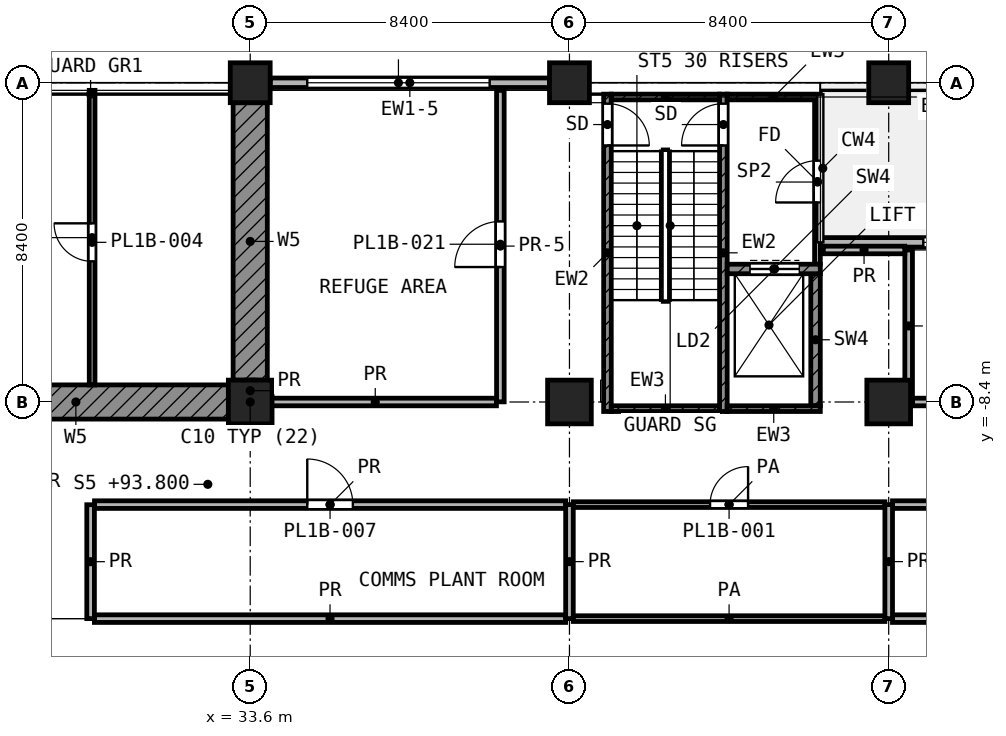
"""IFC4 building model, lengths in metres.
Left out: names, types, materials, properties, quantities, classifications, styles, units other than length and angle.
Written with IfcOpenShell. Run it as: python <this file> out.ifc"""

import sys

from ifc_helpers import new_model, si_unit, direction, frame, frame_2d, origin, origin_2d, place, context, subcontext, project, spatial, rectangle, extrude, element, fill, save


model = new_model("IFC4")
c1 = context("Model", 3, precision=1e-05, world=origin(), true_north=direction((0.0, 1.0)))
c2 = subcontext(c1, "Body", "Model", "MODEL_VIEW")
j1 = project(units=[si_unit("LENGTHUNIT", "METRE"), si_unit("PLANEANGLEUNIT", "RADIAN")], contexts=[c1])
p1 = place(None, origin())
s1 = spatial("IfcSite", under=j1, at=p1, CompositionType="ELEMENT")
p2 = place(p1, origin())
s2 = spatial("IfcBuilding", under=s1, at=p2, CompositionType="ELEMENT")
p3 = place(p2, frame((0.0, 0.0, 93.8)))
s3 = spatial("IfcBuildingStorey", under=s2, at=p3, CompositionType="ELEMENT", Elevation=93.8)
for number, where, z_axis, x_axis in (
    (1, (33.6, 0.0, 0.0), (0.0, 0.0, 1.0), (1.0, 0.0, 0.0)),
    (2, (42.0, 0.0, 0.0), (0.0, 0.0, 1.0), (1.0, 0.0, 0.0)),
    (3, (50.4, 0.0, 0.0), (0.0, 0.0, 1.0), (1.0, 0.0, 0.0)),
):
    element("IfcColumn", number, at=place(p3, frame(where, z_axis=z_axis, x_axis=x_axis)), inside=s3, PredefinedType="COLUMN", context=c2, shape_type="SweptSolid", body=[
        extrude(rectangle(XDim=1.05, YDim=1.05, at=origin_2d()), origin(), (0.0, 0.0, 1.0), 5.0),
    ])
for number, where, z_axis, x_axis in (
    (4, (33.6, -8.4, 0.0), (0.0, 0.0, 1.0), (1.0, 0.0, 0.0)),
    (5, (42.0, -8.4, 0.0), (0.0, 0.0, 1.0), (1.0, 0.0, 0.0)),
    (6, (50.4, -8.4, 0.0), (0.0, 0.0, 1.0), (1.0, 0.0, 0.0)),
):
    element("IfcColumn", number, at=place(p3, frame(where, z_axis=z_axis, x_axis=x_axis)), inside=s3, PredefinedType="COLUMN", context=c2, shape_type="SweptSolid", body=[
        extrude(rectangle(XDim=1.15, YDim=1.15, at=origin_2d()), origin(), (0.0, 0.0, 1.0), 5.0),
    ])
p4 = place(p3, frame((25.0, -8.4, 0.0), z_axis=(0.0, 0.0, 1.0), x_axis=(1.0, 0.0, 0.0)))
e7 = element("IfcWall", 7, at=p4, inside=s3, PredefinedType="SHEAR", context=c2, shape_type="SweptSolid", body=[
    extrude(rectangle(XDim=8.025, YDim=0.9, at=frame_2d((4.012, 0.0))), origin(), (0.0, 0.0, 1.0), 4.4),
])
p5 = place(p3, frame((33.6, -0.525, 0.0), z_axis=(0.0, 0.0, 1.0), x_axis=(0.0, -1.0, 0.0)))
e8 = element("IfcWall", 8, at=p5, inside=s3, PredefinedType="SHEAR", context=c2, shape_type="SweptSolid", body=[
    extrude(rectangle(XDim=7.3, YDim=0.9, at=frame_2d((3.65, 0.0))), origin(), (0.0, 0.0, 1.0), 4.4),
])
p6 = place(p3, frame((56.421, -4.2, 0.0), z_axis=(0.0, 0.0, 1.0), x_axis=(-1.0, 0.0, 0.0)))
e9 = element("IfcWall", 9, at=p6, inside=s3, PredefinedType="SOLIDWALL", context=c2, shape_type="SweptSolid", body=[
    extrude(rectangle(XDim=7.82, YDim=0.25, at=frame_2d((3.91, 0.0))), origin(), (0.0, 0.0, 1.0), 4.4),
])
p7 = place(p6, frame((0.31, 0.0, 0.6)))
e10 = element("IfcOpeningElement", 10, at=p7, cuts=e9, PredefinedType="OPENING", context=c2, shape_type="SweptSolid", body=[
    extrude(rectangle(XDim=4.8, YDim=2.4, at=frame_2d((2.4, 1.2))), frame((0.0, 0.135, 0.0), z_axis=(0.0, -1.0, 0.0), x_axis=(1.0, 0.0, 0.0)), (0.0, 0.0, 1.0), 0.27),
])
p8 = place(p3, frame((41.475, 0.0, 0.0), z_axis=(0.0, 0.0, 1.0), x_axis=(-1.0, 0.0, 0.0)))
e11 = element("IfcWall", 11, at=p8, inside=s3, PredefinedType="SOLIDWALL", context=c2, shape_type="SweptSolid", body=[
    extrude(rectangle(XDim=7.35, YDim=0.25, at=frame_2d((3.675, 0.0))), origin(), (0.0, 0.0, 1.0), 3.0),
])
p9 = place(p8, frame((1.575, 0.0, 0.6)))
e12 = element("IfcOpeningElement", 12, at=p9, cuts=e11, PredefinedType="OPENING", context=c2, shape_type="SweptSolid", body=[
    extrude(rectangle(XDim=4.8, YDim=2.1, at=frame_2d((2.4, 1.05))), frame((0.0, 0.135, 0.0), z_axis=(0.0, -1.0, 0.0), x_axis=(1.0, 0.0, 0.0)), (0.0, 0.0, 1.0), 0.27),
])
p10 = place(p3, frame((43.0, -8.65, 0.0), z_axis=(0.0, 0.0, 1.0), x_axis=(0.0, 1.0, 0.0)))
e13 = element("IfcWall", 13, at=p10, inside=s3, PredefinedType="SHEAR", context=c2, shape_type="SweptSolid", body=[
    extrude(rectangle(XDim=8.35, YDim=0.2, at=frame_2d((4.175, 0.0))), origin(), (0.0, 0.0, 1.0), 4.4),
])
p11 = place(p10, frame((7.0, 0.0, 0.0)))
e14 = element("IfcOpeningElement", 14, at=p11, cuts=e13, PredefinedType="OPENING", context=c2, shape_type="SweptSolid", body=[
    extrude(rectangle(XDim=1.1, YDim=2.1, at=frame_2d((0.55, 1.05))), frame((0.0, 0.11, 0.0), z_axis=(0.0, -1.0, 0.0), x_axis=(1.0, 0.0, 0.0)), (0.0, 0.0, 1.0), 0.22),
])
p12 = place(p3, frame((46.05, -8.65, 0.0), z_axis=(0.0, 0.0, 1.0), x_axis=(0.0, 1.0, 0.0)))
e15 = element("IfcWall", 15, at=p12, inside=s3, PredefinedType="SHEAR", context=c2, shape_type="SweptSolid", body=[
    extrude(rectangle(XDim=8.35, YDim=0.2, at=frame_2d((4.175, 0.0))), origin(), (0.0, 0.0, 1.0), 4.4),
])
p13 = place(p12, frame((7.0, 0.0, 0.0)))
e16 = element("IfcOpeningElement", 16, at=p13, cuts=e15, PredefinedType="OPENING", context=c2, shape_type="SweptSolid", body=[
    extrude(rectangle(XDim=1.1, YDim=2.1, at=frame_2d((0.55, 1.05))), frame((0.0, 0.11, 0.0), z_axis=(0.0, -1.0, 0.0), x_axis=(1.0, 0.0, 0.0)), (0.0, 0.0, 1.0), 0.22),
])
p14 = place(p3, frame((43.1, -0.375, 0.0), z_axis=(0.0, 0.0, 1.0), x_axis=(1.0, 0.0, 0.0)))
e17 = element("IfcWall", 17, at=p14, inside=s3, PredefinedType="SHEAR", context=c2, shape_type="SweptSolid", body=[
    extrude(rectangle(XDim=2.85, YDim=0.15, at=frame_2d((1.425, 0.0))), origin(), (0.0, 0.0, 1.0), 4.4),
])
p15 = place(p3, frame((46.15, -0.375, 0.0), z_axis=(0.0, 0.0, 1.0), x_axis=(1.0, 0.0, 0.0)))
e18 = element("IfcWall", 18, at=p15, inside=s3, PredefinedType="SHEAR", context=c2, shape_type="SweptSolid", body=[
    extrude(rectangle(XDim=2.45, YDim=0.15, at=frame_2d((1.225, 0.0))), origin(), (0.0, 0.0, 1.0), 4.4),
])
p16 = place(p3, frame((43.1, -8.575, 0.0), z_axis=(0.0, 0.0, 1.0), x_axis=(1.0, 0.0, 0.0)))
e19 = element("IfcWall", 19, at=p16, inside=s3, PredefinedType="SHEAR", context=c2, shape_type="SweptSolid", body=[
    extrude(rectangle(XDim=2.85, YDim=0.15, at=frame_2d((1.425, 0.0))), origin(), (0.0, 0.0, 1.0), 4.4),
])
p17 = place(p3, frame((46.15, -8.575, 0.0), z_axis=(0.0, 0.0, 1.0), x_axis=(1.0, 0.0, 0.0)))
e20 = element("IfcWall", 20, at=p17, inside=s3, PredefinedType="SHEAR", context=c2, shape_type="SweptSolid", body=[
    extrude(rectangle(XDim=2.45, YDim=0.15, at=frame_2d((1.225, 0.0))), origin(), (0.0, 0.0, 1.0), 4.4),
])
p18 = place(p3, frame((46.15, -4.9, 0.0), z_axis=(0.0, 0.0, 1.0), x_axis=(1.0, 0.0, 0.0)))
e21 = element("IfcWall", 21, at=p18, inside=s3, PredefinedType="SHEAR", context=c2, shape_type="SweptSolid", body=[
    extrude(rectangle(XDim=2.45, YDim=0.25, at=frame_2d((1.225, 0.0))), origin(), (0.0, 0.0, 1.0), 4.4),
])
p19 = place(p18, frame((0.6, 0.0, 0.0)))
e22 = element("IfcOpeningElement", 22, at=p19, cuts=e21, PredefinedType="OPENING", context=c2, shape_type="SweptSolid", body=[
    extrude(rectangle(XDim=1.3, YDim=2.1, at=frame_2d((0.65, 1.05))), frame((0.0, 0.135, 0.0), z_axis=(0.0, -1.0, 0.0), x_axis=(1.0, 0.0, 0.0)), (0.0, 0.0, 1.0), 0.27),
])
p20 = place(p3, frame((48.475, -8.5, 0.0), z_axis=(0.0, 0.0, 1.0), x_axis=(0.0, 1.0, 0.0)))
e23 = element("IfcWall", 23, at=p20, inside=s3, PredefinedType="SHEAR", context=c2, shape_type="SweptSolid", body=[
    extrude(rectangle(XDim=3.475, YDim=0.25, at=frame_2d((1.738, 0.0))), origin(), (0.0, 0.0, 1.0), 4.4),
])
p21 = place(p3, frame((48.525, -4.775, 0.0), z_axis=(0.0, 0.0, 1.0), x_axis=(0.0, 1.0, 0.0)))
e24 = element("IfcWall", 24, at=p21, inside=s3, PredefinedType="PARTITIONING", context=c2, shape_type="SweptSolid", body=[
    extrude(rectangle(XDim=4.325, YDim=0.15, at=frame_2d((2.163, 0.0))), origin(), (0.0, 0.0, 1.0), 4.4),
])
p22 = place(p21, frame((1.625, 0.0, 0.0)))
e25 = element("IfcOpeningElement", 25, at=p22, cuts=e24, PredefinedType="OPENING", context=c2, shape_type="SweptSolid", body=[
    extrude(rectangle(XDim=1.1, YDim=2.1, at=frame_2d((0.55, 1.05))), frame((0.0, 0.085, 0.0), z_axis=(0.0, -1.0, 0.0), x_axis=(1.0, 0.0, 0.0)), (0.0, 0.0, 1.0), 0.17),
])
p23 = place(p3, frame((42.1, -14.1, 0.0), z_axis=(0.0, 0.0, 1.0), x_axis=(1.0, 0.0, 0.0)))
e26 = element("IfcWall", 26, at=p23, inside=s3, PredefinedType="PARTITIONING", context=c2, shape_type="SweptSolid", body=[
    extrude(rectangle(XDim=8.2, YDim=0.15, at=frame_2d((4.1, 0.0))), origin(), (0.0, 0.0, 1.0), 4.4),
])
p24 = place(p3, frame((42.1, -11.1, 0.0), z_axis=(0.0, 0.0, 1.0), x_axis=(1.0, 0.0, 0.0)))
e27 = element("IfcWall", 27, at=p24, inside=s3, PredefinedType="PARTITIONING", context=c2, shape_type="SweptSolid", body=[
    extrude(rectangle(XDim=8.2, YDim=0.15, at=frame_2d((4.1, 0.0))), origin(), (0.0, 0.0, 1.0), 4.4),
])
p25 = place(p24, frame((3.6, 0.0, 0.0)))
e28 = element("IfcOpeningElement", 28, at=p25, cuts=e27, PredefinedType="OPENING", context=c2, shape_type="SweptSolid", body=[
    extrude(rectangle(XDim=1.0, YDim=2.1, at=frame_2d((0.5, 1.05))), frame((0.0, 0.085, 0.0), z_axis=(0.0, -1.0, 0.0), x_axis=(1.0, 0.0, 0.0)), (0.0, 0.0, 1.0), 0.17),
])
p26 = place(p3, frame((29.44, -7.951, 0.0), z_axis=(0.0, 0.0, 1.0), x_axis=(0.0, 1.0, 0.0)))
e29 = element("IfcWall", 29, at=p26, inside=s3, PredefinedType="PARTITIONING", context=c2, shape_type="SweptSolid", body=[
    extrude(rectangle(XDim=7.751, YDim=0.15, at=frame_2d((3.875, 0.0))), origin(), (0.0, 0.0, 1.0), 3.0),
])
p27 = place(p26, frame((3.252, 0.0, 0.0)))
e30 = element("IfcOpeningElement", 30, at=p27, cuts=e29, PredefinedType="OPENING", context=c2, shape_type="SweptSolid", body=[
    extrude(rectangle(XDim=1.0, YDim=2.1, at=frame_2d((0.5, 1.05))), frame((0.0, 0.085, 0.0), z_axis=(0.0, -1.0, 0.0), x_axis=(1.0, 0.0, 0.0)), (0.0, 0.0, 1.0), 0.17),
])
p28 = place(p3, frame((29.5, -14.1, 0.0), z_axis=(0.0, 0.0, 1.0), x_axis=(1.0, 0.0, 0.0)))
e31 = element("IfcWall", 31, at=p28, inside=s3, PredefinedType="PARTITIONING", context=c2, shape_type="SweptSolid", body=[
    extrude(rectangle(XDim=12.4, YDim=0.2, at=frame_2d((6.2, 0.0))), origin(), (0.0, 0.0, 1.0), 4.4),
])
p29 = place(p3, frame((50.5, -14.1, 0.0), z_axis=(0.0, 0.0, 1.0), x_axis=(1.0, 0.0, 0.0)))
e32 = element("IfcWall", 32, at=p29, inside=s3, PredefinedType="PARTITIONING", context=c2, shape_type="SweptSolid", body=[
    extrude(rectangle(XDim=8.2, YDim=0.2, at=frame_2d((4.1, 0.0))), origin(), (0.0, 0.0, 1.0), 4.4),
])
p30 = place(p3, frame((29.503, -11.1, 0.0), z_axis=(0.0, 0.0, 1.0), x_axis=(1.0, 0.0, 0.0)))
e33 = element("IfcWall", 33, at=p30, inside=s3, PredefinedType="PARTITIONING", context=c2, shape_type="SweptSolid", body=[
    extrude(rectangle(XDim=12.397, YDim=0.2, at=frame_2d((6.198, 0.0))), origin(), (0.0, 0.0, 1.0), 4.4),
])
p31 = place(p30, frame((5.598, 0.0, 0.0)))
e34 = element("IfcOpeningElement", 34, at=p31, cuts=e33, PredefinedType="OPENING", context=c2, shape_type="SweptSolid", body=[
    extrude(rectangle(XDim=1.2, YDim=2.1, at=frame_2d((0.6, 1.05))), frame((0.0, 0.11, 0.0), z_axis=(0.0, -1.0, 0.0), x_axis=(1.0, 0.0, 0.0)), (0.0, 0.0, 1.0), 0.22),
])
p32 = place(p3, frame((50.5, -11.1, 0.0), z_axis=(0.0, 0.0, 1.0), x_axis=(1.0, 0.0, 0.0)))
e35 = element("IfcWall", 35, at=p32, inside=s3, PredefinedType="PARTITIONING", context=c2, shape_type="SweptSolid", body=[
    extrude(rectangle(XDim=8.2, YDim=0.2, at=frame_2d((4.1, 0.0))), origin(), (0.0, 0.0, 1.0), 4.4),
])
p33 = place(p32, frame((3.5, 0.0, 0.0)))
e36 = element("IfcOpeningElement", 36, at=p33, cuts=e35, PredefinedType="OPENING", context=c2, shape_type="SweptSolid", body=[
    extrude(rectangle(XDim=1.2, YDim=2.1, at=frame_2d((0.6, 1.05))), frame((0.0, 0.11, 0.0), z_axis=(0.0, -1.0, 0.0), x_axis=(1.0, 0.0, 0.0)), (0.0, 0.0, 1.0), 0.22),
])
p34 = place(p3, frame((33.701, -8.4, 0.0), z_axis=(0.0, 0.0, 1.0), x_axis=(1.0, 0.0, 0.0)))
e37 = element("IfcWall", 37, at=p34, inside=s3, PredefinedType="PARTITIONING", context=c2, shape_type="SweptSolid", body=[
    extrude(rectangle(XDim=6.378, YDim=0.2, at=frame_2d((3.189, 0.0))), origin(), (0.0, 0.0, 1.0), 4.4),
])
p35 = place(p3, frame((51.027, -8.4, 0.0), z_axis=(0.0, 0.0, 1.0), x_axis=(1.0, 0.0, 0.0)))
e38 = element("IfcWall", 38, at=p35, inside=s3, PredefinedType="PARTITIONING", context=c2, shape_type="SweptSolid", body=[
    extrude(rectangle(XDim=24.493, YDim=0.2, at=frame_2d((12.247, 0.0))), origin(), (0.0, 0.0, 1.0), 4.4),
])
p36 = place(p35, frame((8.436, 0.0, 0.0)))
e39 = element("IfcOpeningElement", 39, at=p36, cuts=e38, PredefinedType="OPENING", context=c2, shape_type="SweptSolid", body=[
    extrude(rectangle(XDim=1.2, YDim=2.1, at=frame_2d((0.6, 1.05))), frame((0.0, 0.11, 0.0), z_axis=(0.0, -1.0, 0.0), x_axis=(1.0, 0.0, 0.0)), (0.0, 0.0, 1.0), 0.22),
])
p37 = place(p35, frame((19.773, 0.0, 0.0)))
e40 = element("IfcOpeningElement", 40, at=p37, cuts=e38, PredefinedType="OPENING", context=c2, shape_type="SweptSolid", body=[
    extrude(rectangle(XDim=1.2, YDim=2.1, at=frame_2d((0.6, 1.05))), frame((0.0, 0.11, 0.0), z_axis=(0.0, -1.0, 0.0), x_axis=(1.0, 0.0, 0.0)), (0.0, 0.0, 1.0), 0.22),
])
p38 = place(p3, frame((48.68, -4.4, 0.0), z_axis=(0.0, 0.0, 1.0), x_axis=(1.0, 0.0, 0.0)))
e41 = element("IfcWall", 41, at=p38, inside=s3, PredefinedType="PARTITIONING", context=c2, shape_type="SweptSolid", body=[
    extrude(rectangle(XDim=2.143, YDim=0.2, at=frame_2d((1.072, 0.0))), origin(), (0.0, 0.0, 1.0), 4.4),
])
p39 = place(p3, frame((29.4, -14.1, 0.0), z_axis=(0.0, 0.0, 1.0), x_axis=(0.0, 1.0, 0.0)))
e42 = element("IfcWall", 42, at=p39, inside=s3, PredefinedType="PARTITIONING", context=c2, shape_type="SweptSolid", body=[
    extrude(rectangle(XDim=2.997, YDim=0.2, at=frame_2d((1.499, 0.0))), origin(), (0.0, 0.0, 1.0), 4.4),
])
p40 = place(p3, frame((33.6, -8.38, 0.0), z_axis=(0.0, 0.0, 1.0), x_axis=(0.0, 1.0, 0.0)))
e43 = element("IfcWall", 43, at=p40, inside=s3, PredefinedType="PARTITIONING", context=c2, shape_type="SweptSolid", body=[
    extrude(rectangle(XDim=0.555, YDim=0.2, at=frame_2d((0.277, 0.0))), origin(), (0.0, 0.0, 1.0), 4.4),
])
p41 = place(p3, frame((40.182, -8.396, 0.0), z_axis=(0.0, 0.0, 1.0), x_axis=(0.0, 1.0, 0.0)))
e44 = element("IfcWall", 44, at=p41, inside=s3, PredefinedType="PARTITIONING", context=c2, shape_type="SweptSolid", body=[
    extrude(rectangle(XDim=8.196, YDim=0.2, at=frame_2d((4.098, 0.0))), origin(), (0.0, 0.0, 1.0), 3.0),
])
p42 = place(p41, frame((3.547, 0.0, 0.0)))
e45 = element("IfcOpeningElement", 45, at=p42, cuts=e44, PredefinedType="OPENING", context=c2, shape_type="SweptSolid", body=[
    extrude(rectangle(XDim=1.2, YDim=2.1, at=frame_2d((0.6, 1.05))), frame((0.0, 0.11, 0.0), z_axis=(0.0, -1.0, 0.0), x_axis=(1.0, 0.0, 0.0)), (0.0, 0.0, 1.0), 0.22),
])
for number, where, z_axis, x_axis in (
    (46, (42.0, -14.1, 0.0), (0.0, 0.0, 1.0), (0.0, 1.0, 0.0)),
    (47, (50.4, -14.1, 0.0), (0.0, 0.0, 1.0), (0.0, 1.0, 0.0)),
):
    element("IfcWall", number, at=place(p3, frame(where, z_axis=z_axis, x_axis=x_axis)), inside=s3, PredefinedType="PARTITIONING", context=c2, shape_type="SweptSolid", body=[
        extrude(rectangle(XDim=3.0, YDim=0.2, at=frame_2d((1.5, 0.0))), origin(), (0.0, 0.0, 1.0), 4.4),
    ])
p43 = place(p3, frame((50.925, -8.397, 0.0), z_axis=(0.0, 0.0, 1.0), x_axis=(0.0, 1.0, 0.0)))
e48 = element("IfcWall", 48, at=p43, inside=s3, PredefinedType="PARTITIONING", context=c2, shape_type="SweptSolid", body=[
    extrude(rectangle(XDim=3.996, YDim=0.2, at=frame_2d((1.998, 0.0))), origin(), (0.0, 0.0, 1.0), 4.4),
])
p44 = place(p7, origin())
e49 = element("IfcWindow", 49, at=p44, inside=s3, PartitioningType="SINGLE_PANEL", PredefinedType="WINDOW", context=c2, shape_type="SweptSolid", body=[
    extrude(rectangle(XDim=4.8, YDim=2.4, at=frame_2d((2.4, 1.2))), frame((0.0, 0.03, 0.0), z_axis=(0.0, -1.0, 0.0), x_axis=(1.0, 0.0, 0.0)), (0.0, 0.0, 1.0), 0.06),
])
fill(e10, e49)
p45 = place(p9, origin())
e50 = element("IfcWindow", 50, at=p45, inside=s3, PartitioningType="SINGLE_PANEL", PredefinedType="WINDOW", context=c2, shape_type="SweptSolid", body=[
    extrude(rectangle(XDim=4.8, YDim=2.1, at=frame_2d((2.4, 1.05))), frame((0.0, 0.03, 0.0), z_axis=(0.0, -1.0, 0.0), x_axis=(1.0, 0.0, 0.0)), (0.0, 0.0, 1.0), 0.06),
])
fill(e12, e50)
p46 = place(p11, frame((1.1, 0.0, 0.0), z_axis=(0.0, 0.0, 1.0), x_axis=(-1.0, 0.0, 0.0)))
e51 = element("IfcDoor", 51, at=p46, inside=s3, OperationType="SINGLE_SWING_LEFT", PredefinedType="DOOR", context=c2, shape_type="SweptSolid", body=[
    extrude(rectangle(XDim=1.1, YDim=2.1, at=frame_2d((0.55, 1.05))), frame((0.0, 0.025, 0.0), z_axis=(0.0, -1.0, 0.0), x_axis=(1.0, 0.0, 0.0)), (0.0, 0.0, 1.0), 0.05),
])
fill(e14, e51)
p47 = place(p13, origin())
e52 = element("IfcDoor", 52, at=p47, inside=s3, OperationType="SINGLE_SWING_LEFT", PredefinedType="DOOR", context=c2, shape_type="SweptSolid", body=[
    extrude(rectangle(XDim=1.1, YDim=2.1, at=frame_2d((0.55, 1.05))), frame((0.0, 0.025, 0.0), z_axis=(0.0, -1.0, 0.0), x_axis=(1.0, 0.0, 0.0)), (0.0, 0.0, 1.0), 0.05),
])
fill(e16, e52)
p48 = place(p19, origin())
e53 = element("IfcDoor", 53, at=p48, inside=s3, OperationType="DOUBLE_DOOR_SLIDING", PredefinedType="DOOR", context=c2, shape_type="SweptSolid", body=[
    extrude(rectangle(XDim=1.3, YDim=2.1, at=frame_2d((0.65, 1.05))), frame((0.0, 0.025, 0.0), z_axis=(0.0, -1.0, 0.0), x_axis=(1.0, 0.0, 0.0)), (0.0, 0.0, 1.0), 0.05),
])
fill(e22, e53)
p49 = place(p22, origin())
e54 = element("IfcDoor", 54, at=p49, inside=s3, OperationType="SINGLE_SWING_LEFT", PredefinedType="DOOR", context=c2, shape_type="SweptSolid", body=[
    extrude(rectangle(XDim=1.1, YDim=2.1, at=frame_2d((0.55, 1.05))), frame((0.0, 0.025, 0.0), z_axis=(0.0, -1.0, 0.0), x_axis=(1.0, 0.0, 0.0)), (0.0, 0.0, 1.0), 0.05),
])
fill(e25, e54)
p50 = place(p42, origin())
e55 = element("IfcDoor", 55, at=p50, inside=s3, OperationType="SINGLE_SWING_LEFT", PredefinedType="DOOR", context=c2, shape_type="SweptSolid", body=[
    extrude(rectangle(XDim=1.2, YDim=2.1, at=frame_2d((0.6, 1.05))), frame((0.0, 0.025, 0.0), z_axis=(0.0, -1.0, 0.0), x_axis=(1.0, 0.0, 0.0)), (0.0, 0.0, 1.0), 0.05),
])
fill(e45, e55)
p51 = place(p31, origin())
e56 = element("IfcDoor", 56, at=p51, inside=s3, OperationType="SINGLE_SWING_LEFT", PredefinedType="DOOR", context=c2, shape_type="SweptSolid", body=[
    extrude(rectangle(XDim=1.2, YDim=2.1, at=frame_2d((0.6, 1.05))), frame((0.0, 0.025, 0.0), z_axis=(0.0, -1.0, 0.0), x_axis=(1.0, 0.0, 0.0)), (0.0, 0.0, 1.0), 0.05),
])
fill(e34, e56)
p52 = place(p25, origin())
e57 = element("IfcDoor", 57, at=p52, inside=s3, OperationType="SINGLE_SWING_RIGHT", PredefinedType="DOOR", context=c2, shape_type="SweptSolid", body=[
    extrude(rectangle(XDim=1.0, YDim=2.1, at=frame_2d((0.5, 1.05))), frame((0.0, 0.025, 0.0), z_axis=(0.0, -1.0, 0.0), x_axis=(1.0, 0.0, 0.0)), (0.0, 0.0, 1.0), 0.05),
])
fill(e28, e57)
p53 = place(p27, origin())
e58 = element("IfcDoor", 58, at=p53, inside=s3, OperationType="SINGLE_SWING_RIGHT", PredefinedType="DOOR", context=c2, shape_type="SweptSolid", body=[
    extrude(rectangle(XDim=1.0, YDim=2.1, at=frame_2d((0.5, 1.05))), frame((0.0, 0.025, 0.0), z_axis=(0.0, -1.0, 0.0), x_axis=(1.0, 0.0, 0.0)), (0.0, 0.0, 1.0), 0.05),
])
fill(e30, e58)
save(model, sys.argv[1])
